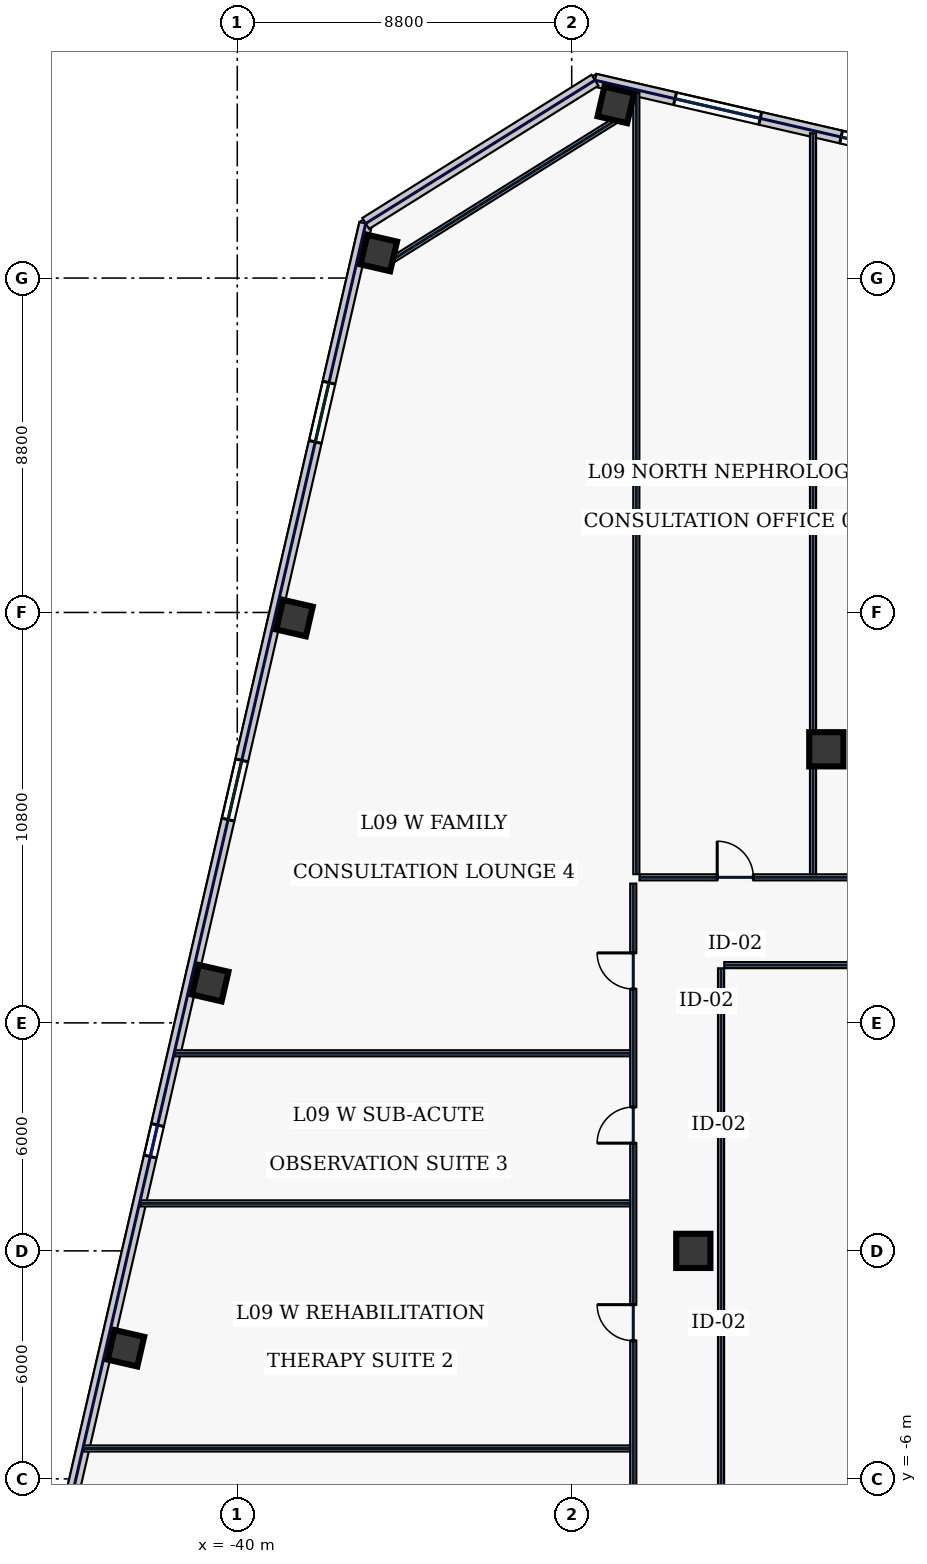
"""IFC4 building model, lengths in metres.
Left out: names, types, materials, properties, quantities, classifications, styles, units other than length and angle.
Written with IfcOpenShell. Run it as: python <this file> out.ifc"""

import sys

from ifc_helpers import new_model, si_unit, direction, frame, frame_2d, origin, origin_2d, place, context, subcontext, project, spatial, rectangle, hollow_rectangle, extrude, element, fill, save


model = new_model("IFC4")
c1 = context("Model", 3, precision=1e-05, world=origin(), true_north=direction((0.0, 1.0)))
c2 = subcontext(c1, "Body", "Model", "MODEL_VIEW")
j1 = project(units=[si_unit("LENGTHUNIT", "METRE"), si_unit("PLANEANGLEUNIT", "RADIAN")], contexts=[c1])
p1 = place(None, origin())
s1 = spatial("IfcSite", under=j1, at=p1, CompositionType="ELEMENT")
p2 = place(p1, origin())
s2 = spatial("IfcBuilding", under=s1, at=p2, CompositionType="ELEMENT")
p3 = place(p2, frame((0.0, 0.0, 47.4)))
s3 = spatial("IfcBuildingStorey", under=s2, at=p3, CompositionType="ELEMENT", Elevation=47.4)
for number, where, z_axis, x_axis in (
    (1, (-24.5, 13.2, 0.0), (0.0, 0.0, 1.0), (1.0, 0.0, 0.0)),
    (2, (-28.0, 0.0, 0.0), (0.0, 0.0, 1.0), (1.0, 0.0, 0.0)),
):
    element("IfcColumn", number, at=place(p3, frame(where, z_axis=z_axis, x_axis=x_axis)), inside=s3, PredefinedType="COLUMN", context=c2, shape_type="SweptSolid", body=[
        extrude(hollow_rectangle(XDim=0.9, YDim=0.9, WallThickness=0.04, at=origin_2d()), origin(), (0.0, 0.0, 1.0), 3.74),
    ])
for number, where, z_axis, x_axis in (
    (3, (-30.04, 30.156, 0.0), (0.0, 0.0, 1.0), (0.974, -0.225, 0.0)),
    (4, (-36.276, 26.26, 0.0), (0.0, 0.0, 1.0), (0.974, -0.225, 0.0)),
    (5, (-38.494, 16.652, 0.0), (0.0, 0.0, 1.0), (0.974, -0.225, 0.0)),
    (6, (-40.712, 7.045, 0.0), (0.0, 0.0, 1.0), (0.974, -0.225, 0.0)),
    (7, (-42.93, -2.562, 0.0), (0.0, 0.0, 1.0), (0.974, -0.225, 0.0)),
):
    element("IfcColumn", number, at=place(p3, frame(where, z_axis=z_axis, x_axis=x_axis)), inside=s3, PredefinedType="COLUMN", context=c2, shape_type="SweptSolid", body=[
        extrude(hollow_rectangle(XDim=0.8, YDim=0.8, WallThickness=0.036, at=origin_2d()), origin(), (0.0, 0.0, 1.0), 3.74),
    ])
p4 = place(p3, frame((-8.517, 25.711, 0.0), z_axis=(0.0, 0.0, 1.0), x_axis=(-0.974372845456, 0.224939009598, 0.0)))
e8 = element("IfcWall", 8, at=p4, inside=s3, PredefinedType="STANDARD", context=c2, shape_type="SweptSolid", body=[
    extrude(rectangle(XDim=22.652, YDim=0.34, at=frame_2d((11.326, 0.0))), origin(), (0.0, 0.0, 1.0), 3.74),
])
p5 = place(p4, frame((18.189, 0.0, 0.77)))
e9 = element("IfcOpeningElement", 9, at=p5, cuts=e8, PredefinedType="OPENING", context=c2, shape_type="SweptSolid", body=[
    extrude(rectangle(XDim=2.3, YDim=2.1, at=frame_2d((1.15, 1.05))), frame((0.0, 0.18, 0.0), z_axis=(0.0, -1.0, 0.0), x_axis=(1.0, 0.0, 0.0)), (0.0, 0.0, 1.0), 0.36),
])
p6 = place(p4, frame((13.705, 0.0, 0.77)))
e10 = element("IfcOpeningElement", 10, at=p6, cuts=e8, PredefinedType="OPENING", context=c2, shape_type="SweptSolid", body=[
    extrude(rectangle(XDim=2.3, YDim=2.1, at=frame_2d((1.15, 1.05))), frame((0.0, 0.18, 0.0), z_axis=(0.0, -1.0, 0.0), x_axis=(1.0, 0.0, 0.0)), (0.0, 0.0, 1.0), 0.36),
])
p7 = place(p4, frame((9.891, 0.0, 0.77)))
e11 = element("IfcOpeningElement", 11, at=p7, cuts=e8, PredefinedType="OPENING", context=c2, shape_type="SweptSolid", body=[
    extrude(rectangle(XDim=0.85, YDim=1.85, at=frame_2d((0.425, 0.925))), frame((0.0, 0.18, 0.0), z_axis=(0.0, -1.0, 0.0), x_axis=(1.0, 0.0, 0.0)), (0.0, 0.0, 1.0), 0.36),
])
p8 = place(p4, frame((3.956, 0.0, 0.77)))
e12 = element("IfcOpeningElement", 12, at=p8, cuts=e8, PredefinedType="OPENING", context=c2, shape_type="SweptSolid", body=[
    extrude(rectangle(XDim=2.3, YDim=2.1, at=frame_2d((1.15, 1.05))), frame((0.0, 0.18, 0.0), z_axis=(0.0, -1.0, 0.0), x_axis=(1.0, 0.0, 0.0)), (0.0, 0.0, 1.0), 0.36),
])
p9 = place(p3, frame((-36.62, 27.037, 0.0), z_axis=(0.0, 0.0, 1.0), x_axis=(-0.224951280646, -0.974370012539, 0.0)))
e13 = element("IfcWall", 13, at=p9, inside=s3, PredefinedType="STANDARD", context=c2, shape_type="SweptSolid", body=[
    extrude(rectangle(XDim=40.8, YDim=0.34, at=frame_2d((20.4, 0.0))), origin(), (0.0, 0.0, 1.0), 3.74),
])
p10 = place(p9, frame((4.3, 0.0, 0.58)))
e14 = element("IfcOpeningElement", 14, at=p10, cuts=e13, PredefinedType="OPENING", context=c2, shape_type="SweptSolid", body=[
    extrude(rectangle(XDim=1.6, YDim=2.3, at=frame_2d((0.8, 1.15))), frame((0.0, 0.18, 0.0), z_axis=(0.0, -1.0, 0.0), x_axis=(1.0, 0.0, 0.0)), (0.0, 0.0, 1.0), 0.36),
])
p11 = place(p9, frame((14.5, 0.0, 0.58)))
e15 = element("IfcOpeningElement", 15, at=p11, cuts=e13, PredefinedType="OPENING", context=c2, shape_type="SweptSolid", body=[
    extrude(rectangle(XDim=1.6, YDim=2.3, at=frame_2d((0.8, 1.15))), frame((0.0, 0.18, 0.0), z_axis=(0.0, -1.0, 0.0), x_axis=(1.0, 0.0, 0.0)), (0.0, 0.0, 1.0), 0.36),
])
p12 = place(p9, frame((24.35, 0.0, 0.75)))
e16 = element("IfcOpeningElement", 16, at=p12, cuts=e13, PredefinedType="OPENING", context=c2, shape_type="SweptSolid", body=[
    extrude(rectangle(XDim=0.85, YDim=1.85, at=frame_2d((0.425, 0.925))), frame((0.0, 0.18, 0.0), z_axis=(0.0, -1.0, 0.0), x_axis=(1.0, 0.0, 0.0)), (0.0, 0.0, 1.0), 0.36),
])
p13 = place(p9, frame((34.9, 0.0, 0.58)))
e17 = element("IfcOpeningElement", 17, at=p13, cuts=e13, PredefinedType="OPENING", context=c2, shape_type="SweptSolid", body=[
    extrude(rectangle(XDim=1.6, YDim=2.3, at=frame_2d((0.8, 1.15))), frame((0.0, 0.18, 0.0), z_axis=(0.0, -1.0, 0.0), x_axis=(1.0, 0.0, 0.0)), (0.0, 0.0, 1.0), 0.36),
])
p14 = place(p3, frame((-30.588, 30.807, 0.0), z_axis=(0.0, 0.0, 1.0), x_axis=(-0.848031080615, -0.529946493819, 0.0)))
e18 = element("IfcWall", 18, at=p14, inside=s3, PredefinedType="STANDARD", context=c2, shape_type="SweptSolid", body=[
    extrude(rectangle(XDim=7.114, YDim=0.34, at=frame_2d((3.557, 0.0))), origin(), (0.0, 0.0, 1.0), 3.74),
])
p15 = place(p3, frame((-29.86, 29.868, 0.0), z_axis=(0.0, 0.0, 1.0), x_axis=(-0.848043064089, -0.529927317139, 0.0)))
e19 = element("IfcWall", 19, at=p15, inside=s3, PredefinedType="PARTITIONING", context=c2, shape_type="SweptSolid", body=[
    extrude(rectangle(XDim=7.354, YDim=0.16, at=frame_2d((3.677, 0.0))), origin(), (0.0, 0.0, 1.0), 3.74),
])
p16 = place(p3, frame((-29.58, -9.615, 0.0), z_axis=(0.0, 0.0, 1.0), x_axis=(0.0, 1.0, 0.0)))
e20 = element("IfcWall", 20, at=p16, inside=s3, PredefinedType="PARTITIONING", context=c2, shape_type="SweptSolid", body=[
    extrude(rectangle(XDim=19.28, YDim=0.16, at=frame_2d((9.64, 0.0))), origin(), (0.0, 0.0, 1.0), 3.74),
])
p17 = place(p16, frame((1.969, 0.0, 0.0)))
e21 = element("IfcOpeningElement", 21, at=p17, cuts=e20, PredefinedType="OPENING", context=c2, shape_type="SweptSolid", body=[
    extrude(rectangle(XDim=0.95, YDim=2.2, at=frame_2d((0.475, 1.1))), frame((0.0, 0.09, 0.0), z_axis=(0.0, -1.0, 0.0), x_axis=(1.0, 0.0, 0.0)), (0.0, 0.0, 1.0), 0.18),
])
p18 = place(p16, frame((7.25, 0.0, 0.0)))
e22 = element("IfcOpeningElement", 22, at=p18, cuts=e20, PredefinedType="OPENING", context=c2, shape_type="SweptSolid", body=[
    extrude(rectangle(XDim=0.95, YDim=2.2, at=frame_2d((0.475, 1.1))), frame((0.0, 0.09, 0.0), z_axis=(0.0, -1.0, 0.0), x_axis=(1.0, 0.0, 0.0)), (0.0, 0.0, 1.0), 0.18),
])
p19 = place(p16, frame((12.45, 0.0, 0.0)))
e23 = element("IfcOpeningElement", 23, at=p19, cuts=e20, PredefinedType="OPENING", context=c2, shape_type="SweptSolid", body=[
    extrude(rectangle(XDim=0.95, YDim=2.2, at=frame_2d((0.475, 1.1))), frame((0.0, 0.09, 0.0), z_axis=(0.0, -1.0, 0.0), x_axis=(1.0, 0.0, 0.0)), (0.0, 0.0, 1.0), 0.18),
])
p20 = place(p16, frame((16.506, 0.0, 0.0)))
e24 = element("IfcOpeningElement", 24, at=p20, cuts=e20, PredefinedType="OPENING", context=c2, shape_type="SweptSolid", body=[
    extrude(rectangle(XDim=0.95, YDim=2.2, at=frame_2d((0.475, 1.1))), frame((0.0, 0.09, 0.0), z_axis=(0.0, -1.0, 0.0), x_axis=(1.0, 0.0, 0.0)), (0.0, 0.0, 1.0), 0.18),
])
p21 = place(p3, frame((-29.415, 9.83, 0.0), z_axis=(0.0, 0.0, 1.0), x_axis=(1.0, 0.0, 0.0)))
e25 = element("IfcWall", 25, at=p21, inside=s3, PredefinedType="PARTITIONING", context=c2, shape_type="SweptSolid", body=[
    extrude(rectangle(XDim=58.83, YDim=0.16, at=frame_2d((29.415, 0.0))), origin(), (0.0, 0.0, 1.0), 3.74),
])
p22 = place(p21, frame((2.044, 0.0, 0.0)))
e26 = element("IfcOpeningElement", 26, at=p22, cuts=e25, PredefinedType="OPENING", context=c2, shape_type="SweptSolid", body=[
    extrude(rectangle(XDim=0.95, YDim=2.2, at=frame_2d((0.475, 1.1))), frame((0.0, 0.09, 0.0), z_axis=(0.0, -1.0, 0.0), x_axis=(1.0, 0.0, 0.0)), (0.0, 0.0, 1.0), 0.18),
])
p23 = place(p21, frame((8.2, 0.0, 0.0)))
e27 = element("IfcOpeningElement", 27, at=p23, cuts=e25, PredefinedType="OPENING", context=c2, shape_type="SweptSolid", body=[
    extrude(rectangle(XDim=0.95, YDim=2.2, at=frame_2d((0.475, 1.1))), frame((0.0, 0.09, 0.0), z_axis=(0.0, -1.0, 0.0), x_axis=(1.0, 0.0, 0.0)), (0.0, 0.0, 1.0), 0.18),
])
p24 = place(p21, frame((15.525, 0.0, 0.0)))
e28 = element("IfcOpeningElement", 28, at=p24, cuts=e25, PredefinedType="OPENING", context=c2, shape_type="SweptSolid", body=[
    extrude(rectangle(XDim=0.95, YDim=2.2, at=frame_2d((0.475, 1.1))), frame((0.0, 0.09, 0.0), z_axis=(0.0, -1.0, 0.0), x_axis=(1.0, 0.0, 0.0)), (0.0, 0.0, 1.0), 0.18),
])
p25 = place(p21, frame((22.125, 0.0, 0.0)))
e29 = element("IfcOpeningElement", 29, at=p25, cuts=e25, PredefinedType="OPENING", context=c2, shape_type="SweptSolid", body=[
    extrude(rectangle(XDim=1.05, YDim=2.2, at=frame_2d((0.525, 1.1))), frame((0.0, 0.09, 0.0), z_axis=(0.0, -1.0, 0.0), x_axis=(1.0, 0.0, 0.0)), (0.0, 0.0, 1.0), 0.18),
])
p26 = place(p21, frame((28.925, 0.0, 0.0)))
e30 = element("IfcOpeningElement", 30, at=p26, cuts=e25, PredefinedType="OPENING", context=c2, shape_type="SweptSolid", body=[
    extrude(rectangle(XDim=0.95, YDim=2.2, at=frame_2d((0.475, 1.1))), frame((0.0, 0.09, 0.0), z_axis=(0.0, -1.0, 0.0), x_axis=(1.0, 0.0, 0.0)), (0.0, 0.0, 1.0), 0.18),
])
p27 = place(p21, frame((36.025, 0.0, 0.0)))
e31 = element("IfcOpeningElement", 31, at=p27, cuts=e25, PredefinedType="OPENING", context=c2, shape_type="SweptSolid", body=[
    extrude(rectangle(XDim=0.95, YDim=2.2, at=frame_2d((0.475, 1.1))), frame((0.0, 0.09, 0.0), z_axis=(0.0, -1.0, 0.0), x_axis=(1.0, 0.0, 0.0)), (0.0, 0.0, 1.0), 0.18),
])
p28 = place(p21, frame((43.225, 0.0, 0.0)))
e32 = element("IfcOpeningElement", 32, at=p28, cuts=e25, PredefinedType="OPENING", context=c2, shape_type="SweptSolid", body=[
    extrude(rectangle(XDim=1.15, YDim=2.2, at=frame_2d((0.575, 1.1))), frame((0.0, 0.09, 0.0), z_axis=(0.0, -1.0, 0.0), x_axis=(1.0, 0.0, 0.0)), (0.0, 0.0, 1.0), 0.18),
])
p29 = place(p21, frame((50.225, 0.0, 0.0)))
e33 = element("IfcOpeningElement", 33, at=p29, cuts=e25, PredefinedType="OPENING", context=c2, shape_type="SweptSolid", body=[
    extrude(rectangle(XDim=0.95, YDim=2.2, at=frame_2d((0.475, 1.1))), frame((0.0, 0.09, 0.0), z_axis=(0.0, -1.0, 0.0), x_axis=(1.0, 0.0, 0.0)), (0.0, 0.0, 1.0), 0.18),
])
p30 = place(p21, frame((55.881, 0.0, 0.0)))
e34 = element("IfcOpeningElement", 34, at=p30, cuts=e25, PredefinedType="OPENING", context=c2, shape_type="SweptSolid", body=[
    extrude(rectangle(XDim=1.05, YDim=2.2, at=frame_2d((0.525, 1.1))), frame((0.0, 0.09, 0.0), z_axis=(0.0, -1.0, 0.0), x_axis=(1.0, 0.0, 0.0)), (0.0, 0.0, 1.0), 0.18),
])
p31 = place(p3, frame((-10.665, 7.52, 0.0), z_axis=(0.0, 0.0, 1.0), x_axis=(-1.0, 0.0, 0.0)))
e35 = element("IfcWall", 35, at=p31, inside=s3, PredefinedType="PARTITIONING", context=c2, shape_type="SweptSolid", body=[
    extrude(rectangle(XDim=16.52, YDim=0.16, at=frame_2d((8.26, 0.0))), origin(), (0.0, 0.0, 1.0), 3.74),
])
p32 = place(p3, frame((-27.27, 7.435, 0.0), z_axis=(0.0, 0.0, 1.0), x_axis=(0.0, -1.0, 0.0)))
e36 = element("IfcWall", 36, at=p32, inside=s3, PredefinedType="PARTITIONING", context=c2, shape_type="SweptSolid", body=[
    extrude(rectangle(XDim=14.82, YDim=0.16, at=frame_2d((7.41, 0.0))), origin(), (0.0, 0.0, 1.0), 3.74),
])
p33 = place(p3, frame((-29.5, 9.915, 0.0), z_axis=(0.0, 0.0, 1.0), x_axis=(0.0, 1.0, 0.0)))
e37 = element("IfcWall", 37, at=p33, inside=s3, PredefinedType="PARTITIONING", context=c2, shape_type="SweptSolid", body=[
    extrude(rectangle(XDim=20.569, YDim=0.16, at=frame_2d((10.284, 0.0))), origin(), (0.0, 0.0, 1.0), 3.74),
])
p34 = place(p3, frame((-24.85, 9.915, 0.0), z_axis=(0.0, 0.0, 1.0), x_axis=(0.0, 1.0, 0.0)))
e38 = element("IfcWall", 38, at=p34, inside=s3, PredefinedType="PARTITIONING", context=c2, shape_type="SweptSolid", body=[
    extrude(rectangle(XDim=19.495, YDim=0.16, at=frame_2d((9.748, 0.0))), origin(), (0.0, 0.0, 1.0), 3.74),
])
p35 = place(p3, frame((-44.042, -5.2, 0.0), z_axis=(0.0, 0.0, 1.0), x_axis=(1.0, 0.0, 0.0)))
e39 = element("IfcWall", 39, at=p35, inside=s3, PredefinedType="PARTITIONING", context=c2, shape_type="SweptSolid", body=[
    extrude(rectangle(XDim=14.377, YDim=0.16, at=frame_2d((7.188, 0.0))), origin(), (0.0, 0.0, 1.0), 3.74),
])
p36 = place(p3, frame((-42.553, 1.25, 0.0), z_axis=(0.0, 0.0, 1.0), x_axis=(1.0, 0.0, 0.0)))
e40 = element("IfcWall", 40, at=p36, inside=s3, PredefinedType="PARTITIONING", context=c2, shape_type="SweptSolid", body=[
    extrude(rectangle(XDim=12.888, YDim=0.16, at=frame_2d((6.444, 0.0))), origin(), (0.0, 0.0, 1.0), 3.74),
])
p37 = place(p3, frame((-41.641, 5.2, 0.0), z_axis=(0.0, 0.0, 1.0), x_axis=(1.0, 0.0, 0.0)))
e41 = element("IfcWall", 41, at=p37, inside=s3, PredefinedType="PARTITIONING", context=c2, shape_type="SweptSolid", body=[
    extrude(rectangle(XDim=11.976, YDim=0.16, at=frame_2d((5.988, 0.0))), origin(), (0.0, 0.0, 1.0), 3.74),
])
p38 = place(p5, origin())
e42 = element("IfcWindow", 42, at=p38, inside=s3, PartitioningType="SINGLE_PANEL", PredefinedType="WINDOW", context=c2, shape_type="SweptSolid", body=[
    extrude(rectangle(XDim=2.3, YDim=2.1, at=frame_2d((1.15, 1.05))), frame((0.0, 0.03, 0.0), z_axis=(0.0, -1.0, 0.0), x_axis=(1.0, 0.0, 0.0)), (0.0, 0.0, 1.0), 0.06),
])
fill(e9, e42)
p39 = place(p6, origin())
e43 = element("IfcWindow", 43, at=p39, inside=s3, PartitioningType="SINGLE_PANEL", PredefinedType="WINDOW", context=c2, shape_type="SweptSolid", body=[
    extrude(rectangle(XDim=2.3, YDim=2.1, at=frame_2d((1.15, 1.05))), frame((0.0, 0.03, 0.0), z_axis=(0.0, -1.0, 0.0), x_axis=(1.0, 0.0, 0.0)), (0.0, 0.0, 1.0), 0.06),
])
fill(e10, e43)
p40 = place(p10, origin())
e44 = element("IfcWindow", 44, at=p40, inside=s3, PartitioningType="SINGLE_PANEL", PredefinedType="WINDOW", context=c2, shape_type="SweptSolid", body=[
    extrude(rectangle(XDim=1.6, YDim=2.3, at=frame_2d((0.8, 1.15))), frame((0.0, 0.03, 0.0), z_axis=(0.0, -1.0, 0.0), x_axis=(1.0, 0.0, 0.0)), (0.0, 0.0, 1.0), 0.06),
])
fill(e14, e44)
p41 = place(p11, origin())
e45 = element("IfcWindow", 45, at=p41, inside=s3, PartitioningType="SINGLE_PANEL", PredefinedType="WINDOW", context=c2, shape_type="SweptSolid", body=[
    extrude(rectangle(XDim=1.6, YDim=2.3, at=frame_2d((0.8, 1.15))), frame((0.0, 0.03, 0.0), z_axis=(0.0, -1.0, 0.0), x_axis=(1.0, 0.0, 0.0)), (0.0, 0.0, 1.0), 0.06),
])
fill(e15, e45)
p42 = place(p12, origin())
e46 = element("IfcWindow", 46, at=p42, inside=s3, PartitioningType="SINGLE_PANEL", PredefinedType="WINDOW", context=c2, shape_type="SweptSolid", body=[
    extrude(rectangle(XDim=0.85, YDim=1.85, at=frame_2d((0.425, 0.925))), frame((0.0, 0.03, 0.0), z_axis=(0.0, -1.0, 0.0), x_axis=(1.0, 0.0, 0.0)), (0.0, 0.0, 1.0), 0.06),
])
fill(e16, e46)
p43 = place(p22, origin())
e47 = element("IfcDoor", 47, at=p43, inside=s3, OperationType="SINGLE_SWING_LEFT", PredefinedType="DOOR", context=c2, shape_type="SweptSolid", body=[
    extrude(rectangle(XDim=0.95, YDim=2.2, at=frame_2d((0.475, 1.1))), frame((0.0, 0.025, 0.0), z_axis=(0.0, -1.0, 0.0), x_axis=(1.0, 0.0, 0.0)), (0.0, 0.0, 1.0), 0.05),
])
fill(e26, e47)
p44 = place(p18, origin())
e48 = element("IfcDoor", 48, at=p44, inside=s3, OperationType="SINGLE_SWING_RIGHT", PredefinedType="DOOR", context=c2, shape_type="SweptSolid", body=[
    extrude(rectangle(XDim=0.95, YDim=2.2, at=frame_2d((0.475, 1.1))), frame((0.0, 0.025, 0.0), z_axis=(0.0, -1.0, 0.0), x_axis=(1.0, 0.0, 0.0)), (0.0, 0.0, 1.0), 0.05),
])
fill(e22, e48)
p45 = place(p19, origin())
e49 = element("IfcDoor", 49, at=p45, inside=s3, OperationType="SINGLE_SWING_LEFT", PredefinedType="DOOR", context=c2, shape_type="SweptSolid", body=[
    extrude(rectangle(XDim=0.95, YDim=2.2, at=frame_2d((0.475, 1.1))), frame((0.0, 0.025, 0.0), z_axis=(0.0, -1.0, 0.0), x_axis=(1.0, 0.0, 0.0)), (0.0, 0.0, 1.0), 0.05),
])
fill(e23, e49)
p46 = place(p20, origin())
e50 = element("IfcDoor", 50, at=p46, inside=s3, OperationType="SINGLE_SWING_RIGHT", PredefinedType="DOOR", context=c2, shape_type="SweptSolid", body=[
    extrude(rectangle(XDim=0.95, YDim=2.2, at=frame_2d((0.475, 1.1))), frame((0.0, 0.025, 0.0), z_axis=(0.0, -1.0, 0.0), x_axis=(1.0, 0.0, 0.0)), (0.0, 0.0, 1.0), 0.05),
])
fill(e24, e50)
save(model, sys.argv[1])
